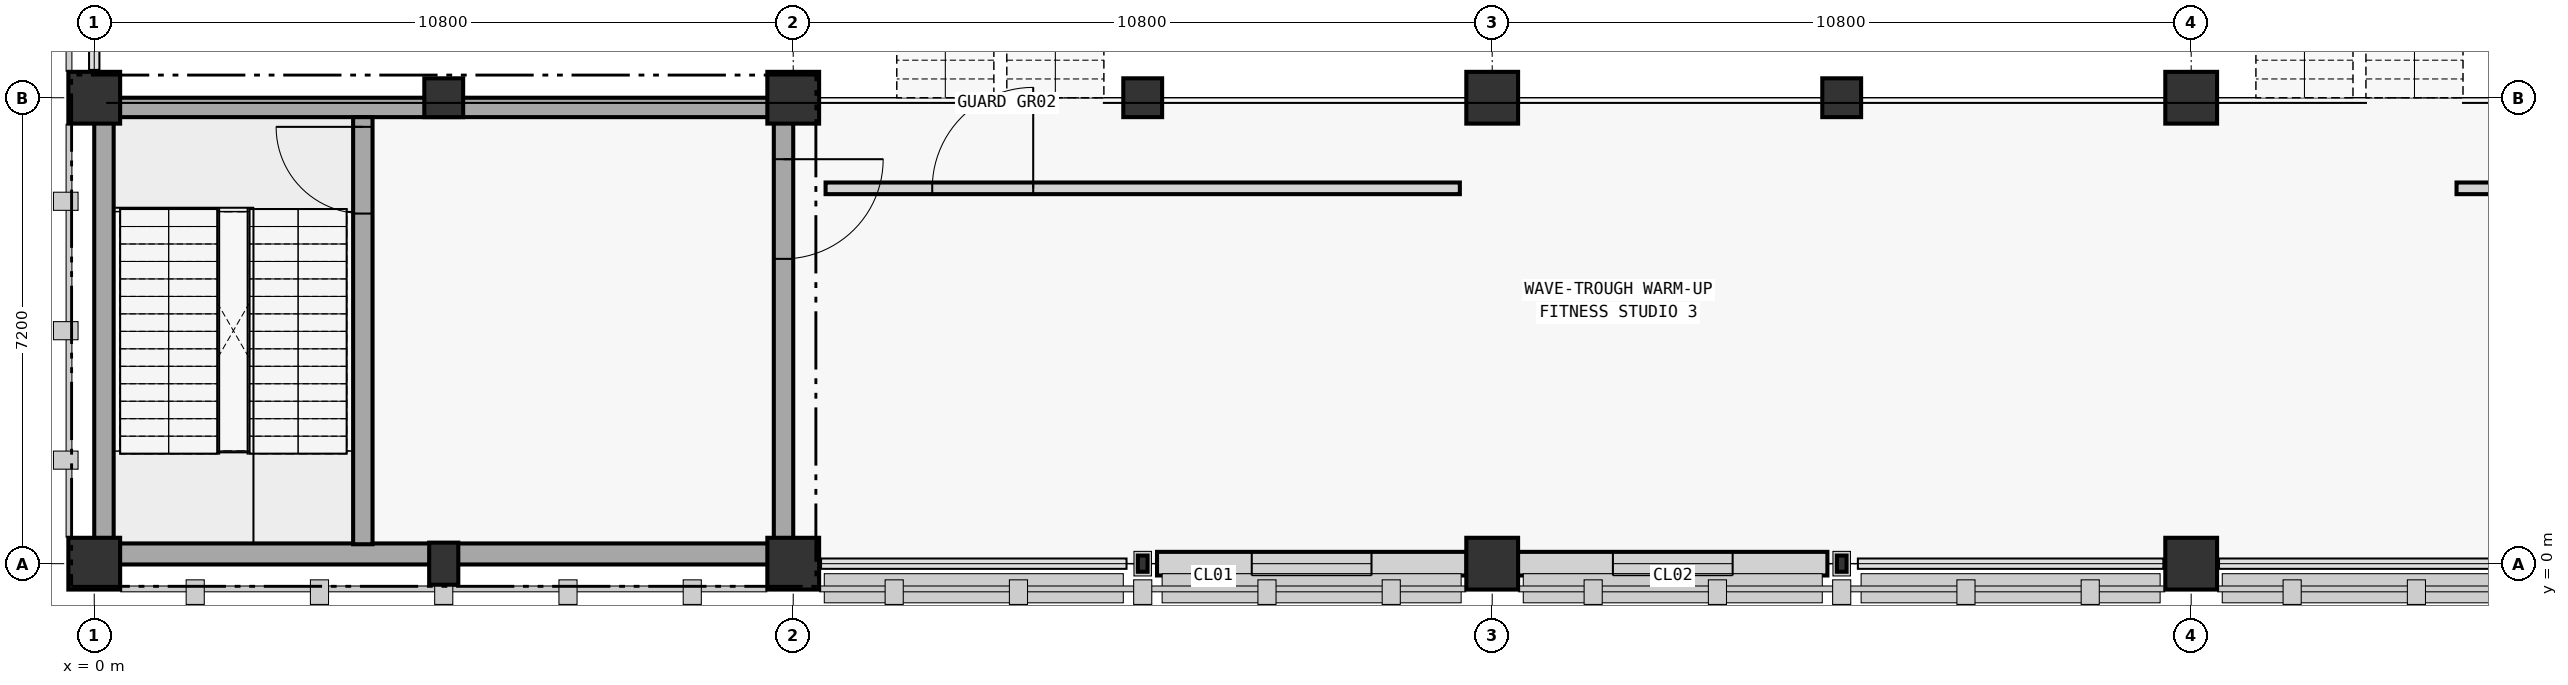
"""IFC4 building model, lengths in metres.
Left out: names, types, materials, properties, quantities, classifications, styles, units other than length and angle.
Written with IfcOpenShell. Run it as: python <this file> out.ifc"""

import sys

from ifc_helpers import new_model, si_unit, direction, frame, frame_2d, origin, origin_2d, place, context, subcontext, project, spatial, rectangle, hollow_rectangle, extrude, element, fill, save


model = new_model("IFC4")
c1 = context("Model", 3, precision=1e-05, world=origin(), true_north=direction((0.0, 1.0)))
c2 = subcontext(c1, "Body", "Model", "MODEL_VIEW")
j1 = project(units=[si_unit("LENGTHUNIT", "METRE"), si_unit("PLANEANGLEUNIT", "RADIAN")], contexts=[c1])
p1 = place(None, origin())
s1 = spatial("IfcSite", under=j1, at=p1, CompositionType="ELEMENT")
p2 = place(p1, origin())
s2 = spatial("IfcBuilding", under=s1, at=p2, CompositionType="ELEMENT")
p3 = place(p2, frame((0.0, 0.0, 5.4)))
s3 = spatial("IfcBuildingStorey", under=s2, at=p3, CompositionType="ELEMENT", Elevation=5.4)
for number, where, z_axis, x_axis in (
    (1, (0.0, 0.0, 0.0), (0.0, 0.0, 1.0), (1.0, 0.0, 0.0)),
    (2, (0.0, 7.2, 0.0), (0.0, 0.0, 1.0), (1.0, 0.0, 0.0)),
    (3, (10.8, 0.0, 0.0), (0.0, 0.0, 1.0), (1.0, 0.0, 0.0)),
    (4, (10.8, 7.2, 0.0), (0.0, 0.0, 1.0), (1.0, 0.0, 0.0)),
    (5, (21.6, 0.0, 0.0), (0.0, 0.0, 1.0), (1.0, 0.0, 0.0)),
    (6, (21.6, 7.2, 0.0), (0.0, 0.0, 1.0), (1.0, 0.0, 0.0)),
    (7, (32.4, 0.0, 0.0), (0.0, 0.0, 1.0), (1.0, 0.0, 0.0)),
    (8, (32.4, 7.2, 0.0), (0.0, 0.0, 1.0), (1.0, 0.0, 0.0)),
):
    element("IfcColumn", number, at=place(p3, frame(where, z_axis=z_axis, x_axis=x_axis)), inside=s3, PredefinedType="COLUMN", context=c2, shape_type="SweptSolid", body=[
        extrude(rectangle(XDim=0.8, YDim=0.8, at=origin_2d()), origin(), (0.0, 0.0, 1.0), 5.4),
    ])
for number, where, z_axis, x_axis in (
    (9, (16.2, 0.0, 0.0), (0.0, 0.0, 1.0), (1.0, 0.0, 0.0)),
    (10, (27.0, 0.0, 0.0), (0.0, 0.0, 1.0), (1.0, 0.0, 0.0)),
):
    element("IfcColumn", number, at=place(p3, frame(where, z_axis=z_axis, x_axis=x_axis)), inside=s3, PredefinedType="PILASTER", context=c2, shape_type="SweptSolid", body=[
        extrude(hollow_rectangle(XDim=0.15, YDim=0.25, WallThickness=0.01, InnerFilletRadius=0.01, OuterFilletRadius=0.02, at=origin_2d()), origin(), (0.0, 0.0, 1.0), 5.4),
    ])
p4 = place(p3, frame((5.4, 0.0, 0.0), z_axis=(0.0, 0.0, 1.0), x_axis=(1.0, 0.0, 0.0)))
e11 = element("IfcColumn", 11, at=p4, inside=s3, PredefinedType="PILASTER", context=c2, shape_type="SweptSolid", body=[
    extrude(rectangle(XDim=0.45, YDim=0.65, at=origin_2d()), origin(), (0.0, 0.0, 1.0), 5.4),
])
for number, where, z_axis, x_axis in (
    (12, (5.4, 7.2, 0.0), (0.0, 0.0, 1.0), (1.0, 0.0, 0.0)),
    (13, (16.2, 7.2, 0.0), (0.0, 0.0, 1.0), (1.0, 0.0, 0.0)),
    (14, (27.0, 7.2, 0.0), (0.0, 0.0, 1.0), (1.0, 0.0, 0.0)),
):
    element("IfcColumn", number, at=place(p3, frame(where, z_axis=z_axis, x_axis=x_axis)), inside=s3, PredefinedType="COLUMN", context=c2, shape_type="SweptSolid", body=[
        extrude(rectangle(XDim=0.6, YDim=0.6, at=origin_2d()), origin(), (0.0, 0.0, 1.0), 5.4),
    ])
p5 = place(p3, frame((10.8, 0.15, 0.0), z_axis=(0.0, 0.0, 1.0), x_axis=(-1.0, 0.0, 0.0)))
e15 = element("IfcWall", 15, at=p5, inside=s3, PredefinedType="SHEAR", context=c2, shape_type="SweptSolid", body=[
    extrude(rectangle(XDim=10.8, YDim=0.325, at=frame_2d((5.4, 0.0))), origin(), (0.0, 0.0, 1.0), 5.4),
])
p6 = place(p3, frame((0.0, 7.05, 0.0), z_axis=(0.0, 0.0, 1.0), x_axis=(1.0, 0.0, 0.0)))
e16 = element("IfcWall", 16, at=p6, inside=s3, PredefinedType="SHEAR", context=c2, shape_type="SweptSolid", body=[
    extrude(rectangle(XDim=10.8, YDim=0.3, at=frame_2d((5.4, 0.0))), origin(), (0.0, 0.0, 1.0), 5.4),
])
p7 = place(p3, frame((0.15, 0.3, 0.0), z_axis=(0.0, 0.0, 1.0), x_axis=(0.0, 1.0, 0.0)))
e17 = element("IfcWall", 17, at=p7, inside=s3, PredefinedType="SHEAR", context=c2, shape_type="SweptSolid", body=[
    extrude(rectangle(XDim=6.6, YDim=0.3, at=frame_2d((3.3, 0.0))), origin(), (0.0, 0.0, 1.0), 5.4),
])
p8 = place(p3, frame((10.65, 6.9, 0.0), z_axis=(0.0, 0.0, 1.0), x_axis=(0.0, -1.0, 0.0)))
e18 = element("IfcWall", 18, at=p8, inside=s3, PredefinedType="SHEAR", context=c2, shape_type="SweptSolid", body=[
    extrude(rectangle(XDim=6.6, YDim=0.3, at=frame_2d((3.3, 0.0))), origin(), (0.0, 0.0, 1.0), 5.4),
])
p9 = place(p8, frame((0.65, 0.0, 0.0)))
e19 = element("IfcOpeningElement", 19, at=p9, cuts=e18, PredefinedType="OPENING", context=c2, shape_type="SweptSolid", body=[
    extrude(rectangle(XDim=1.54, YDim=2.22, at=frame_2d((0.77, 1.11))), frame((0.0, 0.15, 0.0), z_axis=(0.0, -1.0, 0.0), x_axis=(1.0, 0.0, 0.0)), (0.0, 0.0, 1.0), 0.3),
])
p10 = place(p3, frame((4.15, 0.3, 0.0), z_axis=(0.0, 0.0, 1.0), x_axis=(0.0, 1.0, 0.0)))
e20 = element("IfcWall", 20, at=p10, inside=s3, PredefinedType="SHEAR", context=c2, shape_type="SweptSolid", body=[
    extrude(rectangle(XDim=6.6, YDim=0.3, at=frame_2d((3.3, 0.0))), origin(), (0.0, 0.0, 1.0), 5.4),
])
p11 = place(p10, frame((5.11, 0.0, 0.0)))
e21 = element("IfcOpeningElement", 21, at=p11, cuts=e20, PredefinedType="OPENING", context=c2, shape_type="SweptSolid", body=[
    extrude(rectangle(XDim=1.34, YDim=2.18, at=frame_2d((0.67, 1.09))), frame((0.0, 0.15, 0.0), z_axis=(0.0, -1.0, 0.0), x_axis=(1.0, 0.0, 0.0)), (0.0, 0.0, 1.0), 0.3),
])
p12 = place(p3, frame((21.204, 0.0, 0.0), z_axis=(0.0, 0.0, 1.0), x_axis=(-1.0, 0.0, 0.0)))
e22 = element("IfcWall", 22, at=p12, inside=s3, PredefinedType="STANDARD", context=c2, shape_type="SweptSolid", body=[
    extrude(rectangle(XDim=4.783, YDim=0.365, at=frame_2d((2.392, 0.0))), origin(), (0.0, 0.0, 1.0), 4.425),
])
p13 = place(p12, frame((1.469, 0.0, 0.9)))
e23 = element("IfcOpeningElement", 23, at=p13, cuts=e22, PredefinedType="OPENING", context=c2, shape_type="SweptSolid", body=[
    extrude(rectangle(XDim=1.85, YDim=3.15, at=frame_2d((0.925, 1.575))), frame((0.0, 0.183, 0.0), z_axis=(0.0, -1.0, 0.0), x_axis=(1.0, 0.0, 0.0)), (0.0, 0.0, 1.0), 0.365),
])
p14 = place(p3, frame((26.779, 0.0, 0.0), z_axis=(0.0, 0.0, 1.0), x_axis=(-1.0, 0.0, 0.0)))
e24 = element("IfcWall", 24, at=p14, inside=s3, PredefinedType="STANDARD", context=c2, shape_type="SweptSolid", body=[
    extrude(rectangle(XDim=4.783, YDim=0.365, at=frame_2d((2.392, 0.0))), origin(), (0.0, 0.0, 1.0), 4.425),
])
p15 = place(p14, frame((1.464, 0.0, 0.9)))
e25 = element("IfcOpeningElement", 25, at=p15, cuts=e24, PredefinedType="OPENING", context=c2, shape_type="SweptSolid", body=[
    extrude(rectangle(XDim=1.85, YDim=3.15, at=frame_2d((0.925, 1.575))), frame((0.0, 0.183, 0.0), z_axis=(0.0, -1.0, 0.0), x_axis=(1.0, 0.0, 0.0)), (0.0, 0.0, 1.0), 0.365),
])
p16 = place(p3, frame((11.3, 5.8, 0.0), z_axis=(0.0, 0.0, 1.0), x_axis=(1.0, 0.0, 0.0)))
e26 = element("IfcWall", 26, at=p16, inside=s3, PredefinedType="STANDARD", context=c2, shape_type="SweptSolid", body=[
    extrude(rectangle(XDim=9.8, YDim=0.18, at=frame_2d((4.9, 0.0))), origin(), (0.0, 0.0, 1.0), 4.22),
])
p17 = place(p16, frame((1.648, 0.0, 0.0)))
e27 = element("IfcOpeningElement", 27, at=p17, cuts=e26, PredefinedType="OPENING", context=c2, shape_type="SweptSolid", body=[
    extrude(rectangle(XDim=1.56, YDim=2.25, at=frame_2d((0.78, 1.125))), frame((0.0, 0.09, 0.0), z_axis=(0.0, -1.0, 0.0), x_axis=(1.0, 0.0, 0.0)), (0.0, 0.0, 1.0), 0.18),
])
p18 = place(p3, frame((36.5, 5.8, 0.0), z_axis=(0.0, 0.0, 1.0), x_axis=(1.0, 0.0, 0.0)))
e28 = element("IfcWall", 28, at=p18, inside=s3, PredefinedType="STANDARD", context=c2, shape_type="SweptSolid", body=[
    extrude(rectangle(XDim=6.2, YDim=0.18, at=frame_2d((3.1, 0.0))), origin(), (0.0, 0.0, 1.0), 4.22),
])
p19 = place(p18, frame((2.749, 0.0, 0.0)))
e29 = element("IfcOpeningElement", 29, at=p19, cuts=e28, PredefinedType="OPENING", context=c2, shape_type="SweptSolid", body=[
    extrude(rectangle(XDim=1.46, YDim=2.24, at=frame_2d((0.73, 1.12))), frame((0.0, 0.09, 0.0), z_axis=(0.0, -1.0, 0.0), x_axis=(1.0, 0.0, 0.0)), (0.0, 0.0, 1.0), 0.18),
])
p20 = place(p13, origin())
e30 = element("IfcWindow", 30, at=p20, inside=s3, PartitioningType="SINGLE_PANEL", PredefinedType="WINDOW", context=c2, shape_type="SweptSolid", body=[
    extrude(rectangle(XDim=1.85, YDim=3.15, at=frame_2d((0.925, 1.575))), frame((0.0, 0.03, 0.0), z_axis=(0.0, -1.0, 0.0), x_axis=(1.0, 0.0, 0.0)), (0.0, 0.0, 1.0), 0.06),
])
fill(e23, e30)
p21 = place(p15, origin())
e31 = element("IfcWindow", 31, at=p21, inside=s3, PartitioningType="SINGLE_PANEL", PredefinedType="WINDOW", context=c2, shape_type="SweptSolid", body=[
    extrude(rectangle(XDim=1.85, YDim=3.15, at=frame_2d((0.925, 1.575))), frame((0.0, 0.03, 0.0), z_axis=(0.0, -1.0, 0.0), x_axis=(1.0, 0.0, 0.0)), (0.0, 0.0, 1.0), 0.06),
])
fill(e25, e31)
p22 = place(p11, origin())
e32 = element("IfcDoor", 32, at=p22, inside=s3, OperationType="SINGLE_SWING_RIGHT", PredefinedType="DOOR", context=c2, shape_type="SweptSolid", body=[
    extrude(rectangle(XDim=1.34, YDim=2.18, at=frame_2d((0.67, 1.09))), frame((0.0, 0.025, 0.0), z_axis=(0.0, -1.0, 0.0), x_axis=(1.0, 0.0, 0.0)), (0.0, 0.0, 1.0), 0.05),
])
fill(e21, e32)
p23 = place(p9, origin())
e33 = element("IfcDoor", 33, at=p23, inside=s3, OperationType="SINGLE_SWING_LEFT", PredefinedType="DOOR", context=c2, shape_type="SweptSolid", body=[
    extrude(rectangle(XDim=1.54, YDim=2.22, at=frame_2d((0.77, 1.11))), frame((0.0, 0.025, 0.0), z_axis=(0.0, -1.0, 0.0), x_axis=(1.0, 0.0, 0.0)), (0.0, 0.0, 1.0), 0.05),
])
fill(e19, e33)
p24 = place(p17, origin())
e34 = element("IfcDoor", 34, at=p24, inside=s3, OperationType="SINGLE_SWING_RIGHT", PredefinedType="DOOR", context=c2, shape_type="SweptSolid", body=[
    extrude(rectangle(XDim=1.56, YDim=2.25, at=frame_2d((0.78, 1.125))), frame((0.0, 0.025, 0.0), z_axis=(0.0, -1.0, 0.0), x_axis=(1.0, 0.0, 0.0)), (0.0, 0.0, 1.0), 0.05),
])
fill(e27, e34)
save(model, sys.argv[1])
